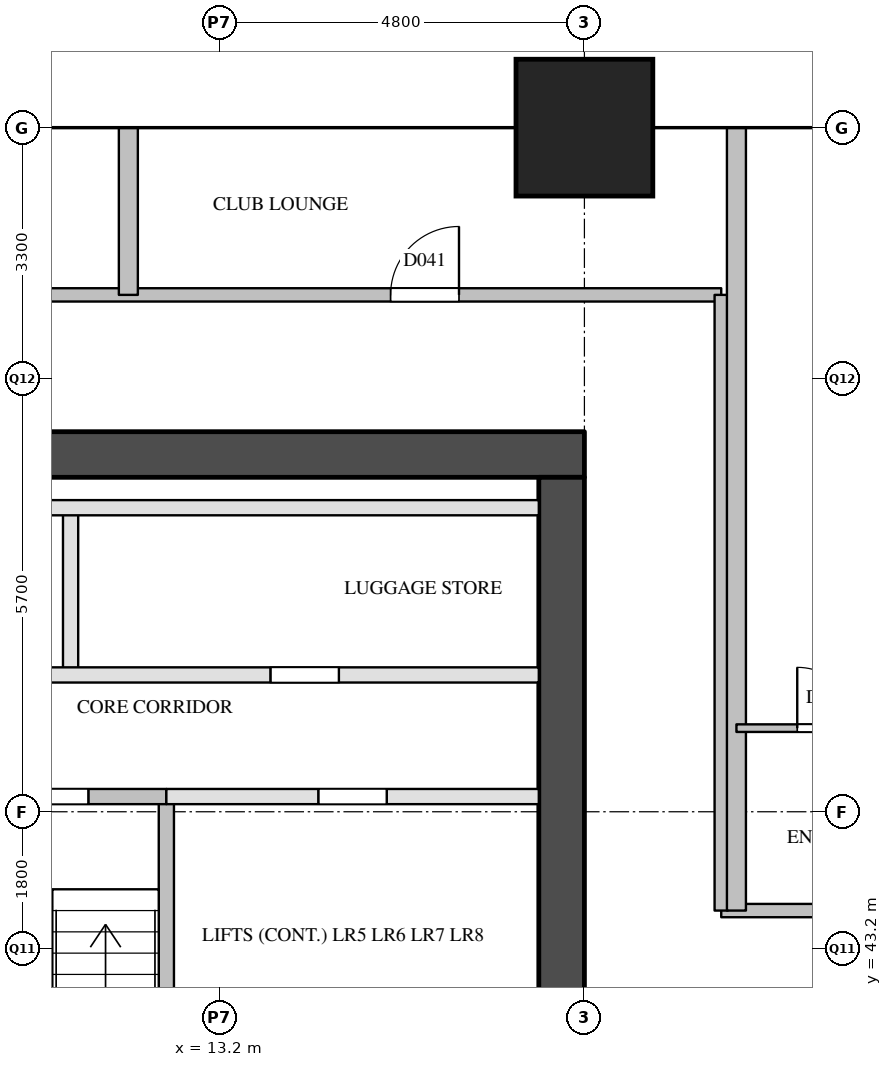
"""IFC4 building model, lengths in metres.
Left out: names, types, materials, properties, quantities, classifications, styles, units other than length and angle.
Written with IfcOpenShell. Run it as: python <this file> out.ifc"""

import sys

from ifc_helpers import new_model, si_unit, direction, frame, frame_2d, origin, origin_2d, place, context, subcontext, project, spatial, rectangle, extrude, element, fill, save


model = new_model("IFC4")
c1 = context("Model", 3, precision=1e-05, world=origin(), true_north=direction((0.0, 1.0)))
c2 = subcontext(c1, "Body", "Model", "MODEL_VIEW")
j1 = project(units=[si_unit("LENGTHUNIT", "METRE"), si_unit("PLANEANGLEUNIT", "RADIAN")], contexts=[c1])
p1 = place(None, origin())
s1 = spatial("IfcSite", under=j1, at=p1, CompositionType="ELEMENT")
p2 = place(p1, origin())
s2 = spatial("IfcBuilding", under=s1, at=p2, CompositionType="ELEMENT")
p3 = place(p2, frame((0.0, 0.0, 34.8)))
s3 = spatial("IfcBuildingStorey", under=s2, at=p3, CompositionType="ELEMENT", Elevation=34.8)
p4 = place(p3, frame((18.0, 54.0, 0.0), z_axis=(0.0, 0.0, 1.0), x_axis=(1.0, 0.0, 0.0)))
e1 = element("IfcColumn", 1, at=p4, inside=s3, PredefinedType="COLUMN", context=c2, shape_type="SweptSolid", body=[
    extrude(rectangle(XDim=1.8, YDim=1.8, at=origin_2d()), origin(), (0.0, 0.0, 1.0), 3.8),
])
p5 = place(p3, frame((5.6, 49.7, 0.0), z_axis=(0.0, 0.0, 1.0), x_axis=(1.0, 0.0, 0.0)))
e2 = element("IfcWall", 2, at=p5, inside=s3, PredefinedType="SHEAR", context=c2, shape_type="SweptSolid", body=[
    extrude(rectangle(XDim=12.4, YDim=0.6, at=frame_2d((6.2, 0.0))), origin(), (0.0, 0.0, 1.0), 3.5),
])
p6 = place(p3, frame((17.7, 29.1, 0.0), z_axis=(0.0, 0.0, 1.0), x_axis=(0.0, 1.0, 0.0)))
e3 = element("IfcWall", 3, at=p6, inside=s3, PredefinedType="SHEAR", context=c2, shape_type="SweptSolid", body=[
    extrude(rectangle(XDim=20.3, YDim=0.6, at=frame_2d((10.15, 0.0))), origin(), (0.0, 0.0, 1.0), 3.5),
])
p7 = place(p6, frame((1.25, 0.0, 0.0)))
e4 = element("IfcOpeningElement", 4, at=p7, cuts=e3, PredefinedType="OPENING", context=c2, shape_type="SweptSolid", body=[
    extrude(rectangle(XDim=0.7, YDim=2.1, at=frame_2d((0.35, 1.05))), frame((0.0, 0.31, 0.0), z_axis=(0.0, -1.0, 0.0), x_axis=(1.0, 0.0, 0.0)), (0.0, 0.0, 1.0), 0.62),
])
p8 = place(p6, frame((7.05, 0.0, 0.0)))
e5 = element("IfcOpeningElement", 5, at=p8, cuts=e3, PredefinedType="OPENING", context=c2, shape_type="SweptSolid", body=[
    extrude(rectangle(XDim=0.7, YDim=2.1, at=frame_2d((0.35, 1.05))), frame((0.0, 0.31, 0.0), z_axis=(0.0, -1.0, 0.0), x_axis=(1.0, 0.0, 0.0)), (0.0, 0.0, 1.0), 0.62),
])
p9 = place(p3, frame((11.24, 46.8, 0.0), z_axis=(0.0, 0.0, 1.0), x_axis=(0.0, 1.0, 0.0)))
e6 = element("IfcWall", 6, at=p9, inside=s3, PredefinedType="PARTITIONING", context=c2, shape_type="SweptSolid", body=[
    extrude(rectangle(XDim=2.2, YDim=0.2, at=frame_2d((1.1, 0.0))), origin(), (0.0, 0.0, 1.0), 3.5),
])
p10 = place(p3, frame((12.5, 40.9, 0.0), z_axis=(0.0, 0.0, 1.0), x_axis=(0.0, 1.0, 0.0)))
e7 = element("IfcWall", 7, at=p10, inside=s3, PredefinedType="SOLIDWALL", context=c2, shape_type="SweptSolid", body=[
    extrude(rectangle(XDim=4.3, YDim=0.2, at=frame_2d((2.15, 0.0))), origin(), (0.0, 0.0, 1.0), 3.5),
])
p11 = place(p3, frame((12.5, 45.2, 0.0), z_axis=(0.0, 0.0, 1.0), x_axis=(1.0, 0.0, 0.0)))
e8 = element("IfcWall", 8, at=p11, inside=s3, PredefinedType="PARTITIONING", context=c2, shape_type="SweptSolid", body=[
    extrude(rectangle(XDim=4.9, YDim=0.2, at=frame_2d((2.45, 0.0))), origin(), (0.0, 0.0, 1.0), 3.5),
])
p12 = place(p11, frame((2.0, 0.0, 0.0)))
e9 = element("IfcOpeningElement", 9, at=p12, cuts=e8, PredefinedType="OPENING", context=c2, shape_type="SweptSolid", body=[
    extrude(rectangle(XDim=0.9, YDim=2.1, at=frame_2d((0.45, 1.05))), frame((0.0, 0.11, 0.0), z_axis=(0.0, -1.0, 0.0), x_axis=(1.0, 0.0, 0.0)), (0.0, 0.0, 1.0), 0.22),
])
p13 = place(p3, frame((6.2, 45.2, 0.0), z_axis=(0.0, 0.0, 1.0), x_axis=(1.0, 0.0, 0.0)))
e10 = element("IfcWall", 10, at=p13, inside=s3, PredefinedType="SOLIDWALL", context=c2, shape_type="SweptSolid", body=[
    extrude(rectangle(XDim=6.3, YDim=0.2, at=frame_2d((3.15, 0.0))), origin(), (0.0, 0.0, 1.0), 3.5),
])
p14 = place(p13, frame((1.025, 0.0, 0.0)))
e11 = element("IfcOpeningElement", 11, at=p14, cuts=e10, PredefinedType="OPENING", context=c2, shape_type="SweptSolid", body=[
    extrude(rectangle(XDim=1.1, YDim=2.1, at=frame_2d((0.55, 1.05))), frame((0.0, 0.11, 0.0), z_axis=(0.0, -1.0, 0.0), x_axis=(1.0, 0.0, 0.0)), (0.0, 0.0, 1.0), 0.22),
])
p15 = place(p13, frame((4.175, 0.0, 0.0)))
e12 = element("IfcOpeningElement", 12, at=p15, cuts=e10, PredefinedType="OPENING", context=c2, shape_type="SweptSolid", body=[
    extrude(rectangle(XDim=1.1, YDim=2.1, at=frame_2d((0.55, 1.05))), frame((0.0, 0.11, 0.0), z_axis=(0.0, -1.0, 0.0), x_axis=(1.0, 0.0, 0.0)), (0.0, 0.0, 1.0), 0.22),
])
p16 = place(p3, frame((6.2, 46.8, 0.0), z_axis=(0.0, 0.0, 1.0), x_axis=(1.0, 0.0, 0.0)))
e13 = element("IfcWall", 13, at=p16, inside=s3, PredefinedType="PARTITIONING", context=c2, shape_type="SweptSolid", body=[
    extrude(rectangle(XDim=11.2, YDim=0.2, at=frame_2d((5.6, 0.0))), origin(), (0.0, 0.0, 1.0), 3.5),
])
p17 = place(p16, frame((2.07, 0.0, 0.0)))
e14 = element("IfcOpeningElement", 14, at=p17, cuts=e13, PredefinedType="OPENING", context=c2, shape_type="SweptSolid", body=[
    extrude(rectangle(XDim=0.9, YDim=2.1, at=frame_2d((0.45, 1.05))), frame((0.0, 0.11, 0.0), z_axis=(0.0, -1.0, 0.0), x_axis=(1.0, 0.0, 0.0)), (0.0, 0.0, 1.0), 0.22),
])
p18 = place(p16, frame((7.67, 0.0, 0.0)))
e15 = element("IfcOpeningElement", 15, at=p18, cuts=e13, PredefinedType="OPENING", context=c2, shape_type="SweptSolid", body=[
    extrude(rectangle(XDim=0.9, YDim=2.1, at=frame_2d((0.45, 1.05))), frame((0.0, 0.11, 0.0), z_axis=(0.0, -1.0, 0.0), x_axis=(1.0, 0.0, 0.0)), (0.0, 0.0, 1.0), 0.22),
])
p19 = place(p3, frame((6.2, 49.0, 0.0), z_axis=(0.0, 0.0, 1.0), x_axis=(1.0, 0.0, 0.0)))
e16 = element("IfcWall", 16, at=p19, inside=s3, PredefinedType="PARTITIONING", context=c2, shape_type="SweptSolid", body=[
    extrude(rectangle(XDim=11.2, YDim=0.2, at=frame_2d((5.6, 0.0))), origin(), (0.0, 0.0, 1.0), 3.5),
])
p20 = place(p3, frame((19.8, 43.7, 0.0), z_axis=(0.0, 0.0, 1.0), x_axis=(1.0, 0.0, 0.0)))
e17 = element("IfcWall", 17, at=p20, inside=s3, PredefinedType="PARTITIONING", context=c2, shape_type="SweptSolid", body=[
    extrude(rectangle(XDim=14.4, YDim=0.175, at=frame_2d((7.2, 0.0))), origin(), (0.0, 0.0, 1.0), 2.5),
])
p21 = place(p20, frame((2.9, 0.0, 0.0)))
e18 = element("IfcOpeningElement", 18, at=p21, cuts=e17, PredefinedType="OPENING", context=c2, shape_type="SweptSolid", body=[
    extrude(rectangle(XDim=1.0, YDim=2.1, at=frame_2d((0.5, 1.05))), frame((0.0, 0.097, 0.0), z_axis=(0.0, -1.0, 0.0), x_axis=(1.0, 0.0, 0.0)), (0.0, 0.0, 1.0), 0.195),
])
p22 = place(p20, frame((9.07, 0.0, 0.0)))
e19 = element("IfcOpeningElement", 19, at=p22, cuts=e17, PredefinedType="OPENING", context=c2, shape_type="SweptSolid", body=[
    extrude(rectangle(XDim=0.9, YDim=2.1, at=frame_2d((0.45, 1.05))), frame((0.0, 0.097, 0.0), z_axis=(0.0, -1.0, 0.0), x_axis=(1.0, 0.0, 0.0)), (0.0, 0.0, 1.0), 0.195),
])
p23 = place(p3, frame((3.8, 51.8, 0.0), z_axis=(0.0, 0.0, 1.0), x_axis=(1.0, 0.0, 0.0)))
e20 = element("IfcWall", 20, at=p23, inside=s3, PredefinedType="PARTITIONING", context=c2, shape_type="SweptSolid", body=[
    extrude(rectangle(XDim=16.0, YDim=0.175, at=frame_2d((8.0, 0.0))), origin(), (0.0, 0.0, 1.0), 3.5),
])
p24 = place(p23, frame((11.65, 0.0, 0.0)))
e21 = element("IfcOpeningElement", 21, at=p24, cuts=e20, PredefinedType="OPENING", context=c2, shape_type="SweptSolid", body=[
    extrude(rectangle(XDim=0.9, YDim=2.1, at=frame_2d((0.45, 1.05))), frame((0.0, 0.097, 0.0), z_axis=(0.0, -1.0, 0.0), x_axis=(1.0, 0.0, 0.0)), (0.0, 0.0, 1.0), 0.195),
])
p25 = place(p3, frame((19.8, 43.7, 0.0), z_axis=(0.0, 0.0, 1.0), x_axis=(0.0, 1.0, 0.0)))
e22 = element("IfcWall", 22, at=p25, inside=s3, PredefinedType="PARTITIONING", context=c2, shape_type="SweptSolid", body=[
    extrude(rectangle(XDim=8.1, YDim=0.175, at=frame_2d((4.05, 0.0))), origin(), (0.0, 0.0, 1.0), 3.5),
])
p26 = place(p3, frame((12.0, 51.8, 0.0), z_axis=(0.0, 0.0, 1.0), x_axis=(0.0, 1.0, 0.0)))
e23 = element("IfcWall", 23, at=p26, inside=s3, PredefinedType="PARTITIONING", context=c2, shape_type="SweptSolid", body=[
    extrude(rectangle(XDim=2.2, YDim=0.25, at=frame_2d((1.1, 0.0))), origin(), (0.0, 0.0, 1.0), 2.5),
])
p27 = place(p3, frame((20.0, 43.7, 0.0), z_axis=(0.0, 0.0, 1.0), x_axis=(0.0, 1.0, 0.0)))
e24 = element("IfcWall", 24, at=p27, inside=s3, PredefinedType="PARTITIONING", context=c2, shape_type="SweptSolid", body=[
    extrude(rectangle(XDim=10.3, YDim=0.25, at=frame_2d((5.15, 0.0))), origin(), (0.0, 0.0, 1.0), 2.5),
])
p28 = place(p3, frame((20.0, 46.1, 0.0), z_axis=(0.0, 0.0, 1.0), x_axis=(1.0, 0.0, 0.0)))
e25 = element("IfcWall", 25, at=p28, inside=s3, PredefinedType="PARTITIONING", context=c2, shape_type="SweptSolid", body=[
    extrude(rectangle(XDim=2.4, YDim=0.1, at=frame_2d((1.2, 0.0))), origin(), (0.0, 0.0, 1.0), 3.5),
])
p29 = place(p28, frame((0.8, 0.0, 0.0)))
e26 = element("IfcOpeningElement", 26, at=p29, cuts=e25, PredefinedType="OPENING", context=c2, shape_type="SweptSolid", body=[
    extrude(rectangle(XDim=0.8, YDim=2.1, at=frame_2d((0.4, 1.05))), frame((0.0, 0.06, 0.0), z_axis=(0.0, -1.0, 0.0), x_axis=(1.0, 0.0, 0.0)), (0.0, 0.0, 1.0), 0.12),
])
p30 = place(p15, origin())
e27 = element("IfcDoor", 27, at=p30, inside=s3, OperationType="SINGLE_SWING_RIGHT", PredefinedType="DOOR", context=c2, shape_type="SweptSolid", body=[
    extrude(rectangle(XDim=1.1, YDim=2.1, at=frame_2d((0.55, 1.05))), frame((0.0, 0.025, 0.0), z_axis=(0.0, -1.0, 0.0), x_axis=(1.0, 0.0, 0.0)), (0.0, 0.0, 1.0), 0.05),
])
fill(e12, e27)
p31 = place(p18, origin())
e28 = element("IfcDoor", 28, at=p31, inside=s3, OperationType="SINGLE_SWING_RIGHT", PredefinedType="DOOR", context=c2, shape_type="SweptSolid", body=[
    extrude(rectangle(XDim=0.9, YDim=2.1, at=frame_2d((0.45, 1.05))), frame((0.0, 0.025, 0.0), z_axis=(0.0, -1.0, 0.0), x_axis=(1.0, 0.0, 0.0)), (0.0, 0.0, 1.0), 0.05),
])
fill(e15, e28)
p32 = place(p12, origin())
e29 = element("IfcDoor", 29, at=p32, inside=s3, OperationType="SINGLE_SWING_RIGHT", PredefinedType="DOOR", context=c2, shape_type="SweptSolid", body=[
    extrude(rectangle(XDim=0.9, YDim=2.1, at=frame_2d((0.45, 1.05))), frame((0.0, 0.025, 0.0), z_axis=(0.0, -1.0, 0.0), x_axis=(1.0, 0.0, 0.0)), (0.0, 0.0, 1.0), 0.05),
])
fill(e9, e29)
p33 = place(p29, origin())
e30 = element("IfcDoor", 30, at=p33, inside=s3, OperationType="SINGLE_SWING_LEFT", PredefinedType="DOOR", context=c2, shape_type="SweptSolid", body=[
    extrude(rectangle(XDim=0.8, YDim=2.1, at=frame_2d((0.4, 1.05))), frame((0.0, 0.025, 0.0), z_axis=(0.0, -1.0, 0.0), x_axis=(1.0, 0.0, 0.0)), (0.0, 0.0, 1.0), 0.05),
])
fill(e26, e30)
p34 = place(p24, origin())
e31 = element("IfcDoor", 31, at=p34, inside=s3, OperationType="SINGLE_SWING_RIGHT", PredefinedType="DOOR", context=c2, shape_type="SweptSolid", body=[
    extrude(rectangle(XDim=0.9, YDim=2.1, at=frame_2d((0.45, 1.05))), frame((0.0, 0.025, 0.0), z_axis=(0.0, -1.0, 0.0), x_axis=(1.0, 0.0, 0.0)), (0.0, 0.0, 1.0), 0.05),
])
fill(e21, e31)
save(model, sys.argv[1])
